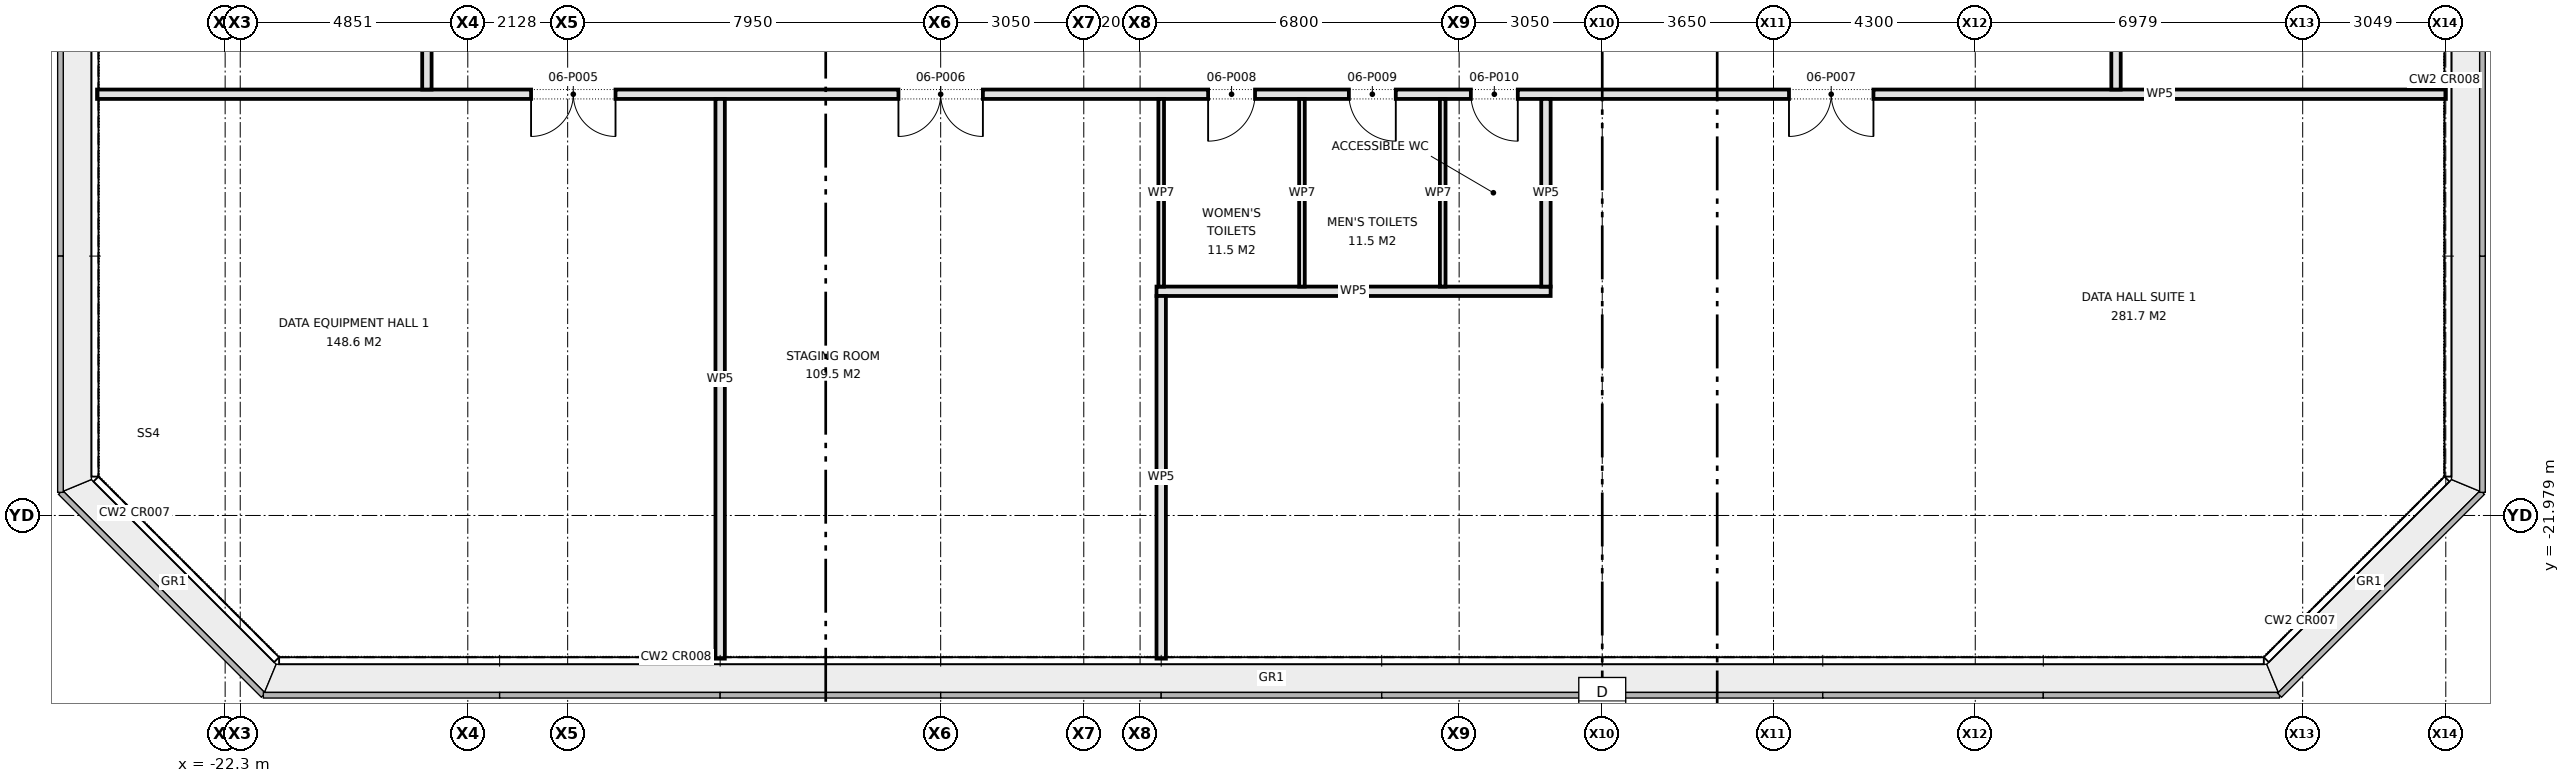
"""IFC4 building model, lengths in metres.
Left out: names, types, materials, properties, quantities, classifications, styles, units other than length and angle.
Written with IfcOpenShell. Run it as: python <this file> out.ifc"""

import sys

from ifc_helpers import new_model, si_unit, direction, frame, frame_2d, origin, place, context, subcontext, project, spatial, rectangle, extrude, element, fill, save


model = new_model("IFC4")
c1 = context("Model", 3, precision=1e-05, world=origin(), true_north=direction((0.0, 1.0)))
c2 = subcontext(c1, "Body", "Model", "MODEL_VIEW")
j1 = project(units=[si_unit("LENGTHUNIT", "METRE"), si_unit("PLANEANGLEUNIT", "RADIAN")], contexts=[c1])
p1 = place(None, origin())
s1 = spatial("IfcSite", under=j1, at=p1, CompositionType="ELEMENT")
p2 = place(p1, origin())
s2 = spatial("IfcBuilding", under=s1, at=p2, CompositionType="ELEMENT")
p3 = place(p2, frame((0.0, 0.0, 25.7)))
s3 = spatial("IfcBuildingStorey", under=s2, at=p3, CompositionType="ELEMENT", Elevation=25.7)
p4 = place(p3, frame((-2.45, -17.2, 0.0), z_axis=(0.0, 0.0, 1.0), x_axis=(1.0, 0.0, 0.0)))
e1 = element("IfcWall", 1, at=p4, inside=s3, PredefinedType="PARTITIONING", context=c2, shape_type="SweptSolid", body=[
    extrude(rectangle(XDim=8.4, YDim=0.2, at=frame_2d((4.2, 0.0))), origin(), (0.0, 0.0, 1.0), 4.575),
])
p5 = place(p3, frame((-25.03, -13.0, 0.0), z_axis=(0.0, 0.0, 1.0), x_axis=(1.0, 0.0, 0.0)))
e2 = element("IfcWall", 2, at=p5, inside=s3, PredefinedType="PARTITIONING", context=c2, shape_type="SweptSolid", body=[
    extrude(rectangle(XDim=50.06, YDim=0.2, at=frame_2d((25.03, 0.0))), origin(), (0.0, 0.0, 1.0), 4.575),
])
p6 = place(p5, frame((9.25, 0.0, 0.0)))
e3 = element("IfcOpeningElement", 3, at=p6, cuts=e2, PredefinedType="OPENING", context=c2, shape_type="SweptSolid", body=[
    extrude(rectangle(XDim=1.8, YDim=2.1, at=frame_2d((0.9, 1.05))), frame((0.0, 0.11, 0.0), z_axis=(0.0, -1.0, 0.0), x_axis=(1.0, 0.0, 0.0)), (0.0, 0.0, 1.0), 0.22),
])
p7 = place(p5, frame((17.08, 0.0, 0.0)))
e4 = element("IfcOpeningElement", 4, at=p7, cuts=e2, PredefinedType="OPENING", context=c2, shape_type="SweptSolid", body=[
    extrude(rectangle(XDim=1.8, YDim=2.1, at=frame_2d((0.9, 1.05))), frame((0.0, 0.11, 0.0), z_axis=(0.0, -1.0, 0.0), x_axis=(1.0, 0.0, 0.0)), (0.0, 0.0, 1.0), 0.22),
])
p8 = place(p5, frame((36.06, 0.0, 0.0)))
e5 = element("IfcOpeningElement", 5, at=p8, cuts=e2, PredefinedType="OPENING", context=c2, shape_type="SweptSolid", body=[
    extrude(rectangle(XDim=1.8, YDim=2.1, at=frame_2d((0.9, 1.05))), frame((0.0, 0.11, 0.0), z_axis=(0.0, -1.0, 0.0), x_axis=(1.0, 0.0, 0.0)), (0.0, 0.0, 1.0), 0.22),
])
p9 = place(p5, frame((23.68, 0.0, 0.0)))
e6 = element("IfcOpeningElement", 6, at=p9, cuts=e2, PredefinedType="OPENING", context=c2, shape_type="SweptSolid", body=[
    extrude(rectangle(XDim=1.0, YDim=2.1, at=frame_2d((0.5, 1.05))), frame((0.0, 0.11, 0.0), z_axis=(0.0, -1.0, 0.0), x_axis=(1.0, 0.0, 0.0)), (0.0, 0.0, 1.0), 0.22),
])
p10 = place(p5, frame((26.68, 0.0, 0.0)))
e7 = element("IfcOpeningElement", 7, at=p10, cuts=e2, PredefinedType="OPENING", context=c2, shape_type="SweptSolid", body=[
    extrude(rectangle(XDim=1.0, YDim=2.1, at=frame_2d((0.5, 1.05))), frame((0.0, 0.11, 0.0), z_axis=(0.0, -1.0, 0.0), x_axis=(1.0, 0.0, 0.0)), (0.0, 0.0, 1.0), 0.22),
])
p11 = place(p5, frame((29.28, 0.0, 0.0)))
e8 = element("IfcOpeningElement", 8, at=p11, cuts=e2, PredefinedType="OPENING", context=c2, shape_type="SweptSolid", body=[
    extrude(rectangle(XDim=1.0, YDim=2.1, at=frame_2d((0.5, 1.05))), frame((0.0, 0.11, 0.0), z_axis=(0.0, -1.0, 0.0), x_axis=(1.0, 0.0, 0.0)), (0.0, 0.0, 1.0), 0.22),
])
p12 = place(p3, frame((18.0, -12.9, 0.0), z_axis=(0.0, 0.0, 1.0), x_axis=(0.0, 1.0, 0.0)))
e9 = element("IfcWall", 9, at=p12, inside=s3, PredefinedType="PARTITIONING", context=c2, shape_type="SweptSolid", body=[
    extrude(rectangle(XDim=25.8, YDim=0.2, at=frame_2d((12.9, 0.0))), origin(), (0.0, 0.0, 1.0), 4.575),
])
p13 = place(p12, frame((4.725, 0.0, 0.0)))
e10 = element("IfcOpeningElement", 10, at=p13, cuts=e9, PredefinedType="OPENING", context=c2, shape_type="SweptSolid", body=[
    extrude(rectangle(XDim=1.0, YDim=2.1, at=frame_2d((0.5, 1.05))), frame((0.0, 0.11, 0.0), z_axis=(0.0, -1.0, 0.0), x_axis=(1.0, 0.0, 0.0)), (0.0, 0.0, 1.0), 0.22),
])
p14 = place(p12, frame((14.65, 0.0, 0.0)))
e11 = element("IfcOpeningElement", 11, at=p14, cuts=e9, PredefinedType="OPENING", context=c2, shape_type="SweptSolid", body=[
    extrude(rectangle(XDim=1.2, YDim=2.1, at=frame_2d((0.6, 1.05))), frame((0.0, 0.11, 0.0), z_axis=(0.0, -1.0, 0.0), x_axis=(1.0, 0.0, 0.0)), (0.0, 0.0, 1.0), 0.22),
])
p15 = place(p12, frame((22.025, 0.0, 0.0)))
e12 = element("IfcOpeningElement", 12, at=p15, cuts=e9, PredefinedType="OPENING", context=c2, shape_type="SweptSolid", body=[
    extrude(rectangle(XDim=1.8, YDim=2.1, at=frame_2d((0.9, 1.05))), frame((0.0, 0.11, 0.0), z_axis=(0.0, -1.0, 0.0), x_axis=(1.0, 0.0, 0.0)), (0.0, 0.0, 1.0), 0.22),
])
p16 = place(p3, frame((5.85, -17.1, 0.0), z_axis=(0.0, 0.0, 1.0), x_axis=(0.0, 1.0, 0.0)))
e13 = element("IfcWall", 13, at=p16, inside=s3, PredefinedType="PARTITIONING", context=c2, shape_type="SweptSolid", body=[
    extrude(rectangle(XDim=4.0, YDim=0.2, at=frame_2d((2.0, 0.0))), origin(), (0.0, 0.0, 1.0), 4.575),
])
p17 = place(p3, frame((-2.35, -25.03, 0.0), z_axis=(0.0, 0.0, 1.0), x_axis=(0.0, 1.0, 0.0)))
e14 = element("IfcWall", 14, at=p17, inside=s3, PredefinedType="PARTITIONING", context=c2, shape_type="SweptSolid", body=[
    extrude(rectangle(XDim=7.73, YDim=0.2, at=frame_2d((3.865, 0.0))), origin(), (0.0, 0.0, 1.0), 4.575),
])
p18 = place(p3, frame((-11.75, -25.03, 0.0), z_axis=(0.0, 0.0, 1.0), x_axis=(0.0, 1.0, 0.0)))
e15 = element("IfcWall", 15, at=p18, inside=s3, PredefinedType="PARTITIONING", context=c2, shape_type="SweptSolid", body=[
    extrude(rectangle(XDim=11.93, YDim=0.2, at=frame_2d((5.965, 0.0))), origin(), (0.0, 0.0, 1.0), 4.575),
])
p19 = place(p3, frame((-18.0, -12.9, 0.0), z_axis=(0.0, 0.0, 1.0), x_axis=(0.0, 1.0, 0.0)))
e16 = element("IfcWall", 16, at=p19, inside=s3, PredefinedType="PARTITIONING", context=c2, shape_type="SweptSolid", body=[
    extrude(rectangle(XDim=30.3, YDim=0.2, at=frame_2d((15.15, 0.0))), origin(), (0.0, 0.0, 1.0), 4.575),
])
p20 = place(p19, frame((6.675, 0.0, 0.0)))
e17 = element("IfcOpeningElement", 17, at=p20, cuts=e16, PredefinedType="OPENING", context=c2, shape_type="SweptSolid", body=[
    extrude(rectangle(XDim=1.8, YDim=2.1, at=frame_2d((0.9, 1.05))), frame((0.0, 0.11, 0.0), z_axis=(0.0, -1.0, 0.0), x_axis=(1.0, 0.0, 0.0)), (0.0, 0.0, 1.0), 0.22),
])
p21 = place(p19, frame((19.675, 0.0, 0.0)))
e18 = element("IfcOpeningElement", 18, at=p21, cuts=e16, PredefinedType="OPENING", context=c2, shape_type="SweptSolid", body=[
    extrude(rectangle(XDim=1.8, YDim=2.1, at=frame_2d((0.9, 1.05))), frame((0.0, 0.11, 0.0), z_axis=(0.0, -1.0, 0.0), x_axis=(1.0, 0.0, 0.0)), (0.0, 0.0, 1.0), 0.22),
])
for number, where, z_axis, x_axis in (
    (19, (3.65, -17.1, 0.0), (0.0, 0.0, 1.0), (0.0, 1.0, 0.0)),
    (20, (0.65, -17.1, 0.0), (0.0, 0.0, 1.0), (0.0, 1.0, 0.0)),
    (21, (-2.35, -17.1, 0.0), (0.0, 0.0, 1.0), (0.0, 1.0, 0.0)),
):
    element("IfcWall", number, at=place(p3, frame(where, z_axis=z_axis, x_axis=x_axis)), inside=s3, PredefinedType="PARTITIONING", context=c2, shape_type="SweptSolid", body=[
        extrude(rectangle(XDim=4.0, YDim=0.12, at=frame_2d((2.0, 0.0))), origin(), (0.0, 0.0, 1.0), 4.575),
    ])
p22 = place(p6, frame((1.8, 0.0, 0.0), z_axis=(0.0, 0.0, 1.0), x_axis=(-1.0, 0.0, 0.0)))
e22 = element("IfcDoor", 22, at=p22, inside=s3, OperationType="DOUBLE_DOOR_SINGLE_SWING", PredefinedType="DOOR", context=c2, shape_type="SweptSolid", body=[
    extrude(rectangle(XDim=1.8, YDim=2.1, at=frame_2d((0.9, 1.05))), frame((0.0, 0.025, 0.0), z_axis=(0.0, -1.0, 0.0), x_axis=(1.0, 0.0, 0.0)), (0.0, 0.0, 1.0), 0.05),
])
fill(e3, e22)
p23 = place(p7, frame((1.8, 0.0, 0.0), z_axis=(0.0, 0.0, 1.0), x_axis=(-1.0, 0.0, 0.0)))
e23 = element("IfcDoor", 23, at=p23, inside=s3, OperationType="DOUBLE_DOOR_SINGLE_SWING", PredefinedType="DOOR", context=c2, shape_type="SweptSolid", body=[
    extrude(rectangle(XDim=1.8, YDim=2.1, at=frame_2d((0.9, 1.05))), frame((0.0, 0.025, 0.0), z_axis=(0.0, -1.0, 0.0), x_axis=(1.0, 0.0, 0.0)), (0.0, 0.0, 1.0), 0.05),
])
fill(e4, e23)
p24 = place(p8, frame((1.8, 0.0, 0.0), z_axis=(0.0, 0.0, 1.0), x_axis=(-1.0, 0.0, 0.0)))
e24 = element("IfcDoor", 24, at=p24, inside=s3, OperationType="DOUBLE_DOOR_SINGLE_SWING", PredefinedType="DOOR", context=c2, shape_type="SweptSolid", body=[
    extrude(rectangle(XDim=1.8, YDim=2.1, at=frame_2d((0.9, 1.05))), frame((0.0, 0.025, 0.0), z_axis=(0.0, -1.0, 0.0), x_axis=(1.0, 0.0, 0.0)), (0.0, 0.0, 1.0), 0.05),
])
fill(e5, e24)
p25 = place(p9, frame((1.0, 0.0, 0.0), z_axis=(0.0, 0.0, 1.0), x_axis=(-1.0, 0.0, 0.0)))
e25 = element("IfcDoor", 25, at=p25, inside=s3, OperationType="SINGLE_SWING_RIGHT", PredefinedType="DOOR", context=c2, shape_type="SweptSolid", body=[
    extrude(rectangle(XDim=1.0, YDim=2.1, at=frame_2d((0.5, 1.05))), frame((0.0, 0.025, 0.0), z_axis=(0.0, -1.0, 0.0), x_axis=(1.0, 0.0, 0.0)), (0.0, 0.0, 1.0), 0.05),
])
fill(e6, e25)
p26 = place(p10, frame((1.0, 0.0, 0.0), z_axis=(0.0, 0.0, 1.0), x_axis=(-1.0, 0.0, 0.0)))
e26 = element("IfcDoor", 26, at=p26, inside=s3, OperationType="SINGLE_SWING_LEFT", PredefinedType="DOOR", context=c2, shape_type="SweptSolid", body=[
    extrude(rectangle(XDim=1.0, YDim=2.1, at=frame_2d((0.5, 1.05))), frame((0.0, 0.025, 0.0), z_axis=(0.0, -1.0, 0.0), x_axis=(1.0, 0.0, 0.0)), (0.0, 0.0, 1.0), 0.05),
])
fill(e7, e26)
p27 = place(p11, frame((1.0, 0.0, 0.0), z_axis=(0.0, 0.0, 1.0), x_axis=(-1.0, 0.0, 0.0)))
e27 = element("IfcDoor", 27, at=p27, inside=s3, OperationType="SINGLE_SWING_LEFT", PredefinedType="DOOR", context=c2, shape_type="SweptSolid", body=[
    extrude(rectangle(XDim=1.0, YDim=2.1, at=frame_2d((0.5, 1.05))), frame((0.0, 0.025, 0.0), z_axis=(0.0, -1.0, 0.0), x_axis=(1.0, 0.0, 0.0)), (0.0, 0.0, 1.0), 0.05),
])
fill(e8, e27)
save(model, sys.argv[1])
